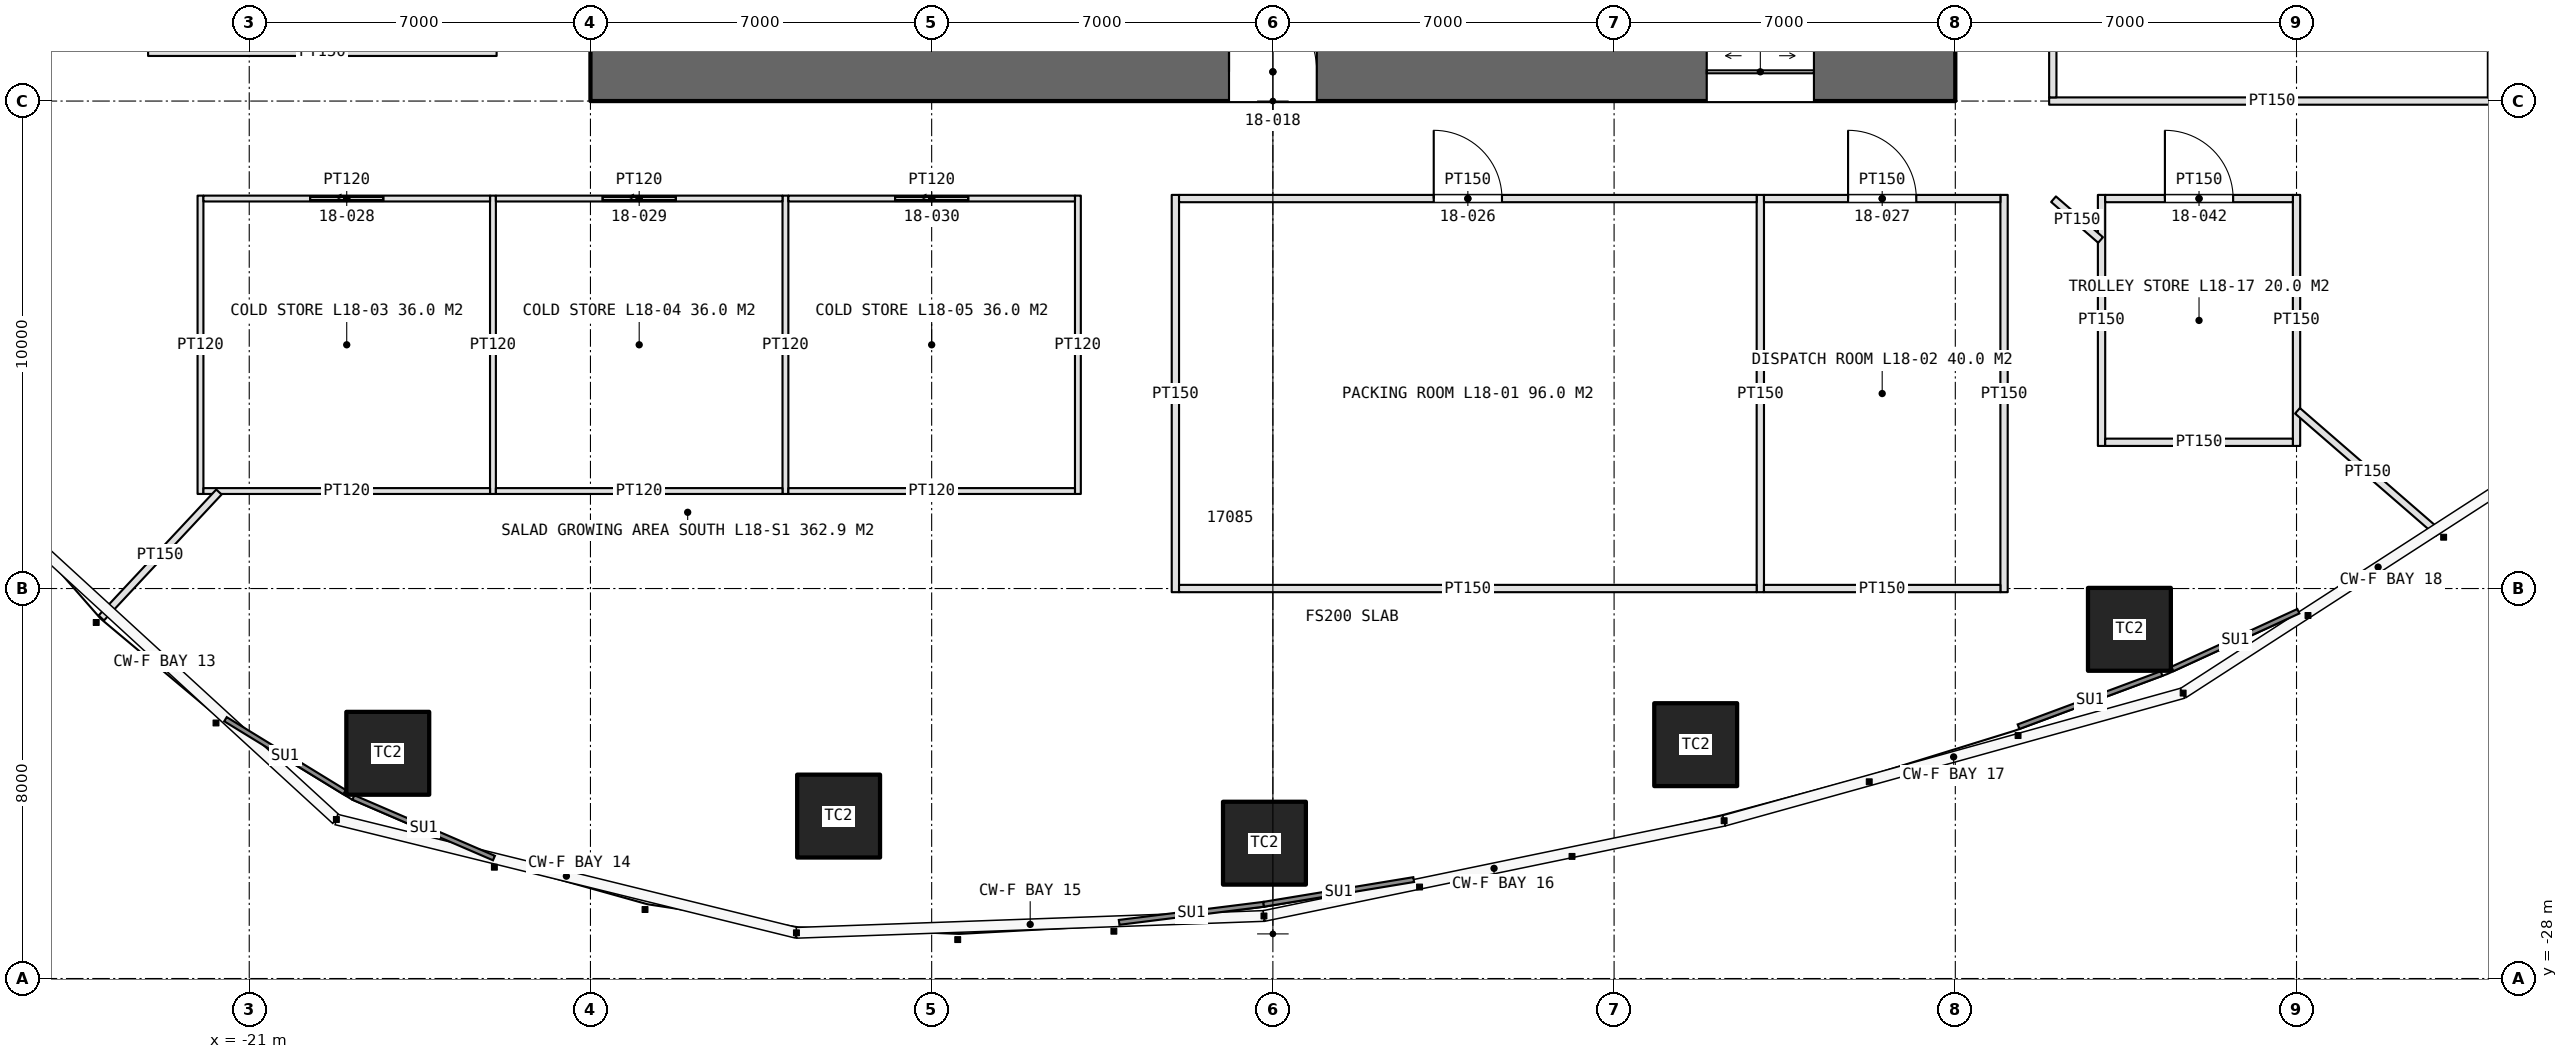
"""IFC4 building model, lengths in metres.
Left out: names, types, materials, properties, quantities, classifications, styles, units other than length and angle.
Written with IfcOpenShell. Run it as: python <this file> out.ifc"""

import sys

from ifc_helpers import new_model, si_unit, direction, frame, frame_2d, origin, origin_2d, place, context, subcontext, project, spatial, rectangle, extrude, element, fill, save


model = new_model("IFC4")
c1 = context("Model", 3, precision=1e-05, world=origin(), true_north=direction((0.0, 1.0)))
c2 = subcontext(c1, "Body", "Model", "MODEL_VIEW")
j1 = project(units=[si_unit("LENGTHUNIT", "METRE"), si_unit("PLANEANGLEUNIT", "RADIAN")], contexts=[c1])
p1 = place(None, origin())
s1 = spatial("IfcSite", under=j1, at=p1, CompositionType="ELEMENT")
p2 = place(p1, origin())
s2 = spatial("IfcBuilding", under=s1, at=p2, CompositionType="ELEMENT")
p3 = place(p2, frame((0.0, 0.0, 90.0)))
s3 = spatial("IfcBuildingStorey", under=s2, at=p3, CompositionType="ELEMENT", Elevation=90.0)
p4 = place(p3, frame((-14.0, -9.4, 0.0), z_axis=(0.0, 0.0, 1.0), x_axis=(1.0, 0.0, 0.0)))
e1 = element("IfcWall", 1, at=p4, inside=s3, PredefinedType="SHEAR", context=c2, shape_type="SweptSolid", body=[
    extrude(rectangle(XDim=28.0, YDim=1.2, at=frame_2d((14.0, 0.0))), origin(), (0.0, 0.0, 1.0), 5.0),
])
p5 = place(p4, frame((13.1, 0.0, 0.0)))
e2 = element("IfcOpeningElement", 2, at=p5, cuts=e1, PredefinedType="OPENING", context=c2, shape_type="SweptSolid", body=[
    extrude(rectangle(XDim=1.8, YDim=2.4, at=frame_2d((0.9, 1.2))), frame((0.0, 0.61, 0.0), z_axis=(0.0, -1.0, 0.0), x_axis=(1.0, 0.0, 0.0)), (0.0, 0.0, 1.0), 1.22),
])
p6 = place(p4, frame((22.9, 0.0, 0.0)))
e3 = element("IfcOpeningElement", 3, at=p6, cuts=e1, PredefinedType="OPENING", context=c2, shape_type="SweptSolid", body=[
    extrude(rectangle(XDim=2.2, YDim=2.7, at=frame_2d((1.1, 1.35))), frame((0.0, 0.61, 0.0), z_axis=(0.0, -1.0, 0.0), x_axis=(1.0, 0.0, 0.0)), (0.0, 0.0, 1.0), 1.22),
])
for number, where, z_axis, x_axis in (
    (4, (-18.158, -23.38, 0.0), (0.0, 0.0, 1.0), (1.0, 0.0, 0.0)),
    (5, (-8.909, -24.668, 0.0), (0.0, 0.0, 1.0), (1.0, 0.0, 0.0)),
    (6, (-0.173, -25.224, 0.0), (0.0, 0.0, 1.0), (1.0, 0.0, 0.0)),
    (7, (8.674, -23.203, 0.0), (0.0, 0.0, 1.0), (1.0, 0.0, 0.0)),
    (8, (17.572, -20.837, 0.0), (0.0, 0.0, 1.0), (1.0, 0.0, 0.0)),
):
    element("IfcColumn", number, at=place(p3, frame(where, z_axis=z_axis, x_axis=x_axis)), inside=s3, PredefinedType="COLUMN", context=c2, shape_type="SweptSolid", body=[
        extrude(rectangle(XDim=1.7, YDim=1.7, at=origin_2d()), origin(), (0.0, 0.0, 1.0), 5.0),
    ])
for number, where, z_axis, x_axis in (
    (9, (-2.0, -11.925, 0.0), (0.0, 0.0, 1.0), (0.0, -1.0, 0.0)),
    (10, (10.0, -11.925, 0.0), (0.0, 0.0, 1.0), (0.0, -1.0, 0.0)),
    (11, (15.0, -11.925, 0.0), (0.0, 0.0, 1.0), (0.0, -1.0, 0.0)),
):
    element("IfcWall", number, at=place(p3, frame(where, z_axis=z_axis, x_axis=x_axis)), inside=s3, PredefinedType="PARTITIONING", context=c2, shape_type="SweptSolid", body=[
        extrude(rectangle(XDim=8.15, YDim=0.15, at=frame_2d((4.075, 0.0))), origin(), (0.0, 0.0, 1.0), 3.6),
    ])
p7 = place(p3, frame((-1.925, -12.0, 0.0), z_axis=(0.0, 0.0, 1.0), x_axis=(1.0, 0.0, 0.0)))
e12 = element("IfcWall", 12, at=p7, inside=s3, PredefinedType="PARTITIONING", context=c2, shape_type="SweptSolid", body=[
    extrude(rectangle(XDim=11.85, YDim=0.15, at=frame_2d((5.925, 0.0))), origin(), (0.0, 0.0, 1.0), 3.6),
])
p8 = place(p7, frame((5.225, 0.0, 0.0)))
e13 = element("IfcOpeningElement", 13, at=p8, cuts=e12, PredefinedType="OPENING", context=c2, shape_type="SweptSolid", body=[
    extrude(rectangle(XDim=1.4, YDim=2.4, at=frame_2d((0.7, 1.2))), frame((0.0, 0.085, 0.0), z_axis=(0.0, -1.0, 0.0), x_axis=(1.0, 0.0, 0.0)), (0.0, 0.0, 1.0), 0.17),
])
p9 = place(p3, frame((-1.925, -20.0, 0.0), z_axis=(0.0, 0.0, 1.0), x_axis=(1.0, 0.0, 0.0)))
e14 = element("IfcWall", 14, at=p9, inside=s3, PredefinedType="PARTITIONING", context=c2, shape_type="SweptSolid", body=[
    extrude(rectangle(XDim=11.85, YDim=0.15, at=frame_2d((5.925, 0.0))), origin(), (0.0, 0.0, 1.0), 3.6),
])
p10 = place(p3, frame((10.075, -12.0, 0.0), z_axis=(0.0, 0.0, 1.0), x_axis=(1.0, 0.0, 0.0)))
e15 = element("IfcWall", 15, at=p10, inside=s3, PredefinedType="PARTITIONING", context=c2, shape_type="SweptSolid", body=[
    extrude(rectangle(XDim=4.85, YDim=0.15, at=frame_2d((2.425, 0.0))), origin(), (0.0, 0.0, 1.0), 3.6),
])
p11 = place(p10, frame((1.725, 0.0, 0.0)))
e16 = element("IfcOpeningElement", 16, at=p11, cuts=e15, PredefinedType="OPENING", context=c2, shape_type="SweptSolid", body=[
    extrude(rectangle(XDim=1.4, YDim=2.4, at=frame_2d((0.7, 1.2))), frame((0.0, 0.085, 0.0), z_axis=(0.0, -1.0, 0.0), x_axis=(1.0, 0.0, 0.0)), (0.0, 0.0, 1.0), 0.17),
])
p12 = place(p3, frame((10.075, -20.0, 0.0), z_axis=(0.0, 0.0, 1.0), x_axis=(1.0, 0.0, 0.0)))
e17 = element("IfcWall", 17, at=p12, inside=s3, PredefinedType="PARTITIONING", context=c2, shape_type="SweptSolid", body=[
    extrude(rectangle(XDim=4.85, YDim=0.15, at=frame_2d((2.425, 0.0))), origin(), (0.0, 0.0, 1.0), 3.6),
])
for number, where, z_axis, x_axis in (
    (18, (-22.0, -11.94, 0.0), (0.0, 0.0, 1.0), (0.0, -1.0, 0.0)),
    (19, (-16.0, -11.94, 0.0), (0.0, 0.0, 1.0), (0.0, -1.0, 0.0)),
    (20, (-10.0, -11.94, 0.0), (0.0, 0.0, 1.0), (0.0, -1.0, 0.0)),
    (21, (-4.0, -11.94, 0.0), (0.0, 0.0, 1.0), (0.0, -1.0, 0.0)),
):
    element("IfcWall", number, at=place(p3, frame(where, z_axis=z_axis, x_axis=x_axis)), inside=s3, PredefinedType="PARTITIONING", context=c2, shape_type="SweptSolid", body=[
        extrude(rectangle(XDim=6.12, YDim=0.12, at=frame_2d((3.06, 0.0))), origin(), (0.0, 0.0, 1.0), 3.6),
    ])
p13 = place(p3, frame((-21.94, -12.0, 0.0), z_axis=(0.0, 0.0, 1.0), x_axis=(1.0, 0.0, 0.0)))
e22 = element("IfcWall", 22, at=p13, inside=s3, PredefinedType="PARTITIONING", context=c2, shape_type="SweptSolid", body=[
    extrude(rectangle(XDim=5.88, YDim=0.12, at=frame_2d((2.94, 0.0))), origin(), (0.0, 0.0, 1.0), 3.6),
])
p14 = place(p13, frame((2.19, 0.0, 0.0)))
e23 = element("IfcOpeningElement", 23, at=p14, cuts=e22, PredefinedType="OPENING", context=c2, shape_type="SweptSolid", body=[
    extrude(rectangle(XDim=1.5, YDim=2.5, at=frame_2d((0.75, 1.25))), frame((0.0, 0.07, 0.0), z_axis=(0.0, -1.0, 0.0), x_axis=(1.0, 0.0, 0.0)), (0.0, 0.0, 1.0), 0.14),
])
p15 = place(p3, frame((-21.94, -18.0, 0.0), z_axis=(0.0, 0.0, 1.0), x_axis=(1.0, 0.0, 0.0)))
e24 = element("IfcWall", 24, at=p15, inside=s3, PredefinedType="PARTITIONING", context=c2, shape_type="SweptSolid", body=[
    extrude(rectangle(XDim=5.88, YDim=0.12, at=frame_2d((2.94, 0.0))), origin(), (0.0, 0.0, 1.0), 3.6),
])
p16 = place(p3, frame((-15.94, -12.0, 0.0), z_axis=(0.0, 0.0, 1.0), x_axis=(1.0, 0.0, 0.0)))
e25 = element("IfcWall", 25, at=p16, inside=s3, PredefinedType="PARTITIONING", context=c2, shape_type="SweptSolid", body=[
    extrude(rectangle(XDim=5.88, YDim=0.12, at=frame_2d((2.94, 0.0))), origin(), (0.0, 0.0, 1.0), 3.6),
])
p17 = place(p16, frame((2.19, 0.0, 0.0)))
e26 = element("IfcOpeningElement", 26, at=p17, cuts=e25, PredefinedType="OPENING", context=c2, shape_type="SweptSolid", body=[
    extrude(rectangle(XDim=1.5, YDim=2.5, at=frame_2d((0.75, 1.25))), frame((0.0, 0.07, 0.0), z_axis=(0.0, -1.0, 0.0), x_axis=(1.0, 0.0, 0.0)), (0.0, 0.0, 1.0), 0.14),
])
p18 = place(p3, frame((-15.94, -18.0, 0.0), z_axis=(0.0, 0.0, 1.0), x_axis=(1.0, 0.0, 0.0)))
e27 = element("IfcWall", 27, at=p18, inside=s3, PredefinedType="PARTITIONING", context=c2, shape_type="SweptSolid", body=[
    extrude(rectangle(XDim=5.88, YDim=0.12, at=frame_2d((2.94, 0.0))), origin(), (0.0, 0.0, 1.0), 3.6),
])
p19 = place(p3, frame((-9.94, -12.0, 0.0), z_axis=(0.0, 0.0, 1.0), x_axis=(1.0, 0.0, 0.0)))
e28 = element("IfcWall", 28, at=p19, inside=s3, PredefinedType="PARTITIONING", context=c2, shape_type="SweptSolid", body=[
    extrude(rectangle(XDim=5.88, YDim=0.12, at=frame_2d((2.94, 0.0))), origin(), (0.0, 0.0, 1.0), 3.6),
])
p20 = place(p19, frame((2.19, 0.0, 0.0)))
e29 = element("IfcOpeningElement", 29, at=p20, cuts=e28, PredefinedType="OPENING", context=c2, shape_type="SweptSolid", body=[
    extrude(rectangle(XDim=1.5, YDim=2.5, at=frame_2d((0.75, 1.25))), frame((0.0, 0.07, 0.0), z_axis=(0.0, -1.0, 0.0), x_axis=(1.0, 0.0, 0.0)), (0.0, 0.0, 1.0), 0.14),
])
p21 = place(p3, frame((-9.94, -18.0, 0.0), z_axis=(0.0, 0.0, 1.0), x_axis=(1.0, 0.0, 0.0)))
e30 = element("IfcWall", 30, at=p21, inside=s3, PredefinedType="PARTITIONING", context=c2, shape_type="SweptSolid", body=[
    extrude(rectangle(XDim=5.88, YDim=0.12, at=frame_2d((2.94, 0.0))), origin(), (0.0, 0.0, 1.0), 3.6),
])
p22 = place(p3, frame((15.925, -10.0, 0.0), z_axis=(0.0, 0.0, 1.0), x_axis=(1.0, 0.0, 0.0)))
e31 = element("IfcWall", 31, at=p22, inside=s3, PredefinedType="PARTITIONING", context=c2, shape_type="SweptSolid", body=[
    extrude(rectangle(XDim=9.15, YDim=0.15, at=frame_2d((4.575, 0.0))), origin(), (0.0, 0.0, 1.0), 3.6),
])
p23 = place(p3, frame((16.0, -9.925, 0.0), z_axis=(0.0, 0.0, 1.0), x_axis=(0.0, 1.0, 0.0)))
e32 = element("IfcWall", 32, at=p23, inside=s3, PredefinedType="PARTITIONING", context=c2, shape_type="SweptSolid", body=[
    extrude(rectangle(XDim=7.85, YDim=0.15, at=frame_2d((3.925, 0.0))), origin(), (0.0, 0.0, 1.0), 3.6),
])
p24 = place(p23, frame((3.225, 0.0, 0.0)))
e33 = element("IfcOpeningElement", 33, at=p24, cuts=e32, PredefinedType="OPENING", context=c2, shape_type="SweptSolid", body=[
    extrude(rectangle(XDim=1.4, YDim=2.4, at=frame_2d((0.7, 1.2))), frame((0.0, 0.085, 0.0), z_axis=(0.0, -1.0, 0.0), x_axis=(1.0, 0.0, 0.0)), (0.0, 0.0, 1.0), 0.17),
])
p25 = place(p3, frame((-15.925, -9.0, 0.0), z_axis=(0.0, 0.0, 1.0), x_axis=(-1.0, 0.0, 0.0)))
e34 = element("IfcWall", 34, at=p25, inside=s3, PredefinedType="PARTITIONING", context=c2, shape_type="SweptSolid", body=[
    extrude(rectangle(XDim=7.15, YDim=0.15, at=frame_2d((3.575, 0.0))), origin(), (0.0, 0.0, 1.0), 3.6),
])
for number, where, z_axis, x_axis in (
    (35, (17.0, -11.925, 0.0), (0.0, 0.0, 1.0), (0.0, -1.0, 0.0)),
    (36, (21.0, -11.925, 0.0), (0.0, 0.0, 1.0), (0.0, -1.0, 0.0)),
):
    element("IfcWall", number, at=place(p3, frame(where, z_axis=z_axis, x_axis=x_axis)), inside=s3, PredefinedType="PARTITIONING", context=c2, shape_type="SweptSolid", body=[
        extrude(rectangle(XDim=5.15, YDim=0.15, at=frame_2d((2.575, 0.0))), origin(), (0.0, 0.0, 1.0), 3.6),
    ])
p26 = place(p3, frame((17.075, -12.0, 0.0), z_axis=(0.0, 0.0, 1.0), x_axis=(1.0, 0.0, 0.0)))
e37 = element("IfcWall", 37, at=p26, inside=s3, PredefinedType="PARTITIONING", context=c2, shape_type="SweptSolid", body=[
    extrude(rectangle(XDim=3.85, YDim=0.15, at=frame_2d((1.925, 0.0))), origin(), (0.0, 0.0, 1.0), 3.6),
])
p27 = place(p26, frame((1.225, 0.0, 0.0)))
e38 = element("IfcOpeningElement", 38, at=p27, cuts=e37, PredefinedType="OPENING", context=c2, shape_type="SweptSolid", body=[
    extrude(rectangle(XDim=1.4, YDim=2.4, at=frame_2d((0.7, 1.2))), frame((0.0, 0.085, 0.0), z_axis=(0.0, -1.0, 0.0), x_axis=(1.0, 0.0, 0.0)), (0.0, 0.0, 1.0), 0.17),
])
p28 = place(p3, frame((17.075, -17.0, 0.0), z_axis=(0.0, 0.0, 1.0), x_axis=(1.0, 0.0, 0.0)))
e39 = element("IfcWall", 39, at=p28, inside=s3, PredefinedType="PARTITIONING", context=c2, shape_type="SweptSolid", body=[
    extrude(rectangle(XDim=3.85, YDim=0.15, at=frame_2d((1.925, 0.0))), origin(), (0.0, 0.0, 1.0), 3.6),
])
p29 = place(p3, frame((-21.622, -18.02, 0.0), z_axis=(0.0, 0.0, 1.0), x_axis=(-0.682522451791, -0.730864626864, 0.0)))
e40 = element("IfcWall", 40, at=p29, inside=s3, PredefinedType="PARTITIONING", context=c2, shape_type="SweptSolid", body=[
    extrude(rectangle(XDim=3.535, YDim=0.15, at=frame_2d((1.768, 0.0))), origin(), (0.0, 0.0, 1.0), 3.6),
])
p30 = place(p3, frame((21.02, -16.354, 0.0), z_axis=(0.0, 0.0, 1.0), x_axis=(0.755425653008, -0.655234372402, 0.0)))
e41 = element("IfcWall", 41, at=p30, inside=s3, PredefinedType="PARTITIONING", context=c2, shape_type="SweptSolid", body=[
    extrude(rectangle(XDim=3.823, YDim=0.15, at=frame_2d((1.912, 0.0))), origin(), (0.0, 0.0, 1.0), 3.6),
])
p31 = place(p3, frame((16.015, -12.013, 0.0), z_axis=(0.0, 0.0, 1.0), x_axis=(0.755411512729, -0.655250674503, 0.0)))
e42 = element("IfcWall", 42, at=p31, inside=s3, PredefinedType="PARTITIONING", context=c2, shape_type="SweptSolid", body=[
    extrude(rectangle(XDim=1.277, YDim=0.15, at=frame_2d((0.639, 0.0))), origin(), (0.0, 0.0, 1.0), 3.6),
])
p32 = place(p5, origin())
e43 = element("IfcDoor", 43, at=p32, inside=s3, OperationType="DOUBLE_DOOR_SINGLE_SWING", PredefinedType="DOOR", context=c2, shape_type="SweptSolid", body=[
    extrude(rectangle(XDim=1.8, YDim=2.4, at=frame_2d((0.9, 1.2))), frame((0.0, 0.025, 0.0), z_axis=(0.0, -1.0, 0.0), x_axis=(1.0, 0.0, 0.0)), (0.0, 0.0, 1.0), 0.05),
])
fill(e2, e43)
p33 = place(p6, origin())
e44 = element("IfcDoor", 44, at=p33, inside=s3, OperationType="DOUBLE_DOOR_SLIDING", PredefinedType="DOOR", context=c2, shape_type="SweptSolid", body=[
    extrude(rectangle(XDim=2.2, YDim=2.7, at=frame_2d((1.1, 1.35))), frame((0.0, 0.025, 0.0), z_axis=(0.0, -1.0, 0.0), x_axis=(1.0, 0.0, 0.0)), (0.0, 0.0, 1.0), 0.05),
])
fill(e3, e44)
p34 = place(p8, origin())
e45 = element("IfcDoor", 45, at=p34, inside=s3, OperationType="DOUBLE_DOOR_DOUBLE_SWING", PredefinedType="DOOR", context=c2, shape_type="SweptSolid", body=[
    extrude(rectangle(XDim=1.4, YDim=2.4, at=frame_2d((0.7, 1.2))), frame((0.0, 0.025, 0.0), z_axis=(0.0, -1.0, 0.0), x_axis=(1.0, 0.0, 0.0)), (0.0, 0.0, 1.0), 0.05),
])
fill(e13, e45)
p35 = place(p11, origin())
e46 = element("IfcDoor", 46, at=p35, inside=s3, OperationType="DOUBLE_DOOR_DOUBLE_SWING", PredefinedType="DOOR", context=c2, shape_type="SweptSolid", body=[
    extrude(rectangle(XDim=1.4, YDim=2.4, at=frame_2d((0.7, 1.2))), frame((0.0, 0.025, 0.0), z_axis=(0.0, -1.0, 0.0), x_axis=(1.0, 0.0, 0.0)), (0.0, 0.0, 1.0), 0.05),
])
fill(e16, e46)
p36 = place(p14, origin())
e47 = element("IfcDoor", 47, at=p36, inside=s3, OperationType="SLIDING_TO_LEFT", PredefinedType="DOOR", context=c2, shape_type="SweptSolid", body=[
    extrude(rectangle(XDim=1.5, YDim=2.5, at=frame_2d((0.75, 1.25))), frame((0.0, 0.025, 0.0), z_axis=(0.0, -1.0, 0.0), x_axis=(1.0, 0.0, 0.0)), (0.0, 0.0, 1.0), 0.05),
])
fill(e23, e47)
p37 = place(p17, origin())
e48 = element("IfcDoor", 48, at=p37, inside=s3, OperationType="SLIDING_TO_LEFT", PredefinedType="DOOR", context=c2, shape_type="SweptSolid", body=[
    extrude(rectangle(XDim=1.5, YDim=2.5, at=frame_2d((0.75, 1.25))), frame((0.0, 0.025, 0.0), z_axis=(0.0, -1.0, 0.0), x_axis=(1.0, 0.0, 0.0)), (0.0, 0.0, 1.0), 0.05),
])
fill(e26, e48)
p38 = place(p20, origin())
e49 = element("IfcDoor", 49, at=p38, inside=s3, OperationType="SLIDING_TO_LEFT", PredefinedType="DOOR", context=c2, shape_type="SweptSolid", body=[
    extrude(rectangle(XDim=1.5, YDim=2.5, at=frame_2d((0.75, 1.25))), frame((0.0, 0.025, 0.0), z_axis=(0.0, -1.0, 0.0), x_axis=(1.0, 0.0, 0.0)), (0.0, 0.0, 1.0), 0.05),
])
fill(e29, e49)
p39 = place(p27, origin())
e50 = element("IfcDoor", 50, at=p39, inside=s3, OperationType="DOUBLE_DOOR_DOUBLE_SWING", PredefinedType="DOOR", context=c2, shape_type="SweptSolid", body=[
    extrude(rectangle(XDim=1.4, YDim=2.4, at=frame_2d((0.7, 1.2))), frame((0.0, 0.025, 0.0), z_axis=(0.0, -1.0, 0.0), x_axis=(1.0, 0.0, 0.0)), (0.0, 0.0, 1.0), 0.05),
])
fill(e38, e50)
save(model, sys.argv[1])
